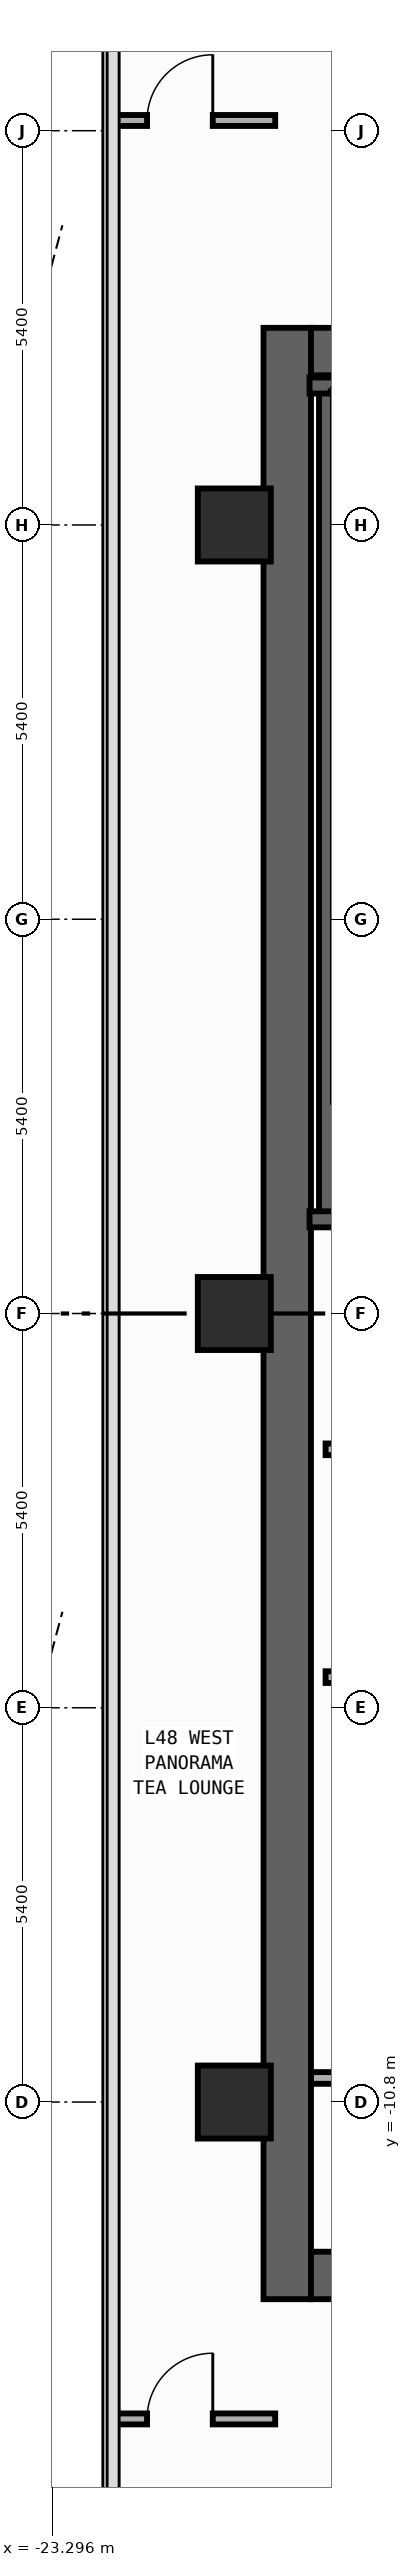
"""IFC4 building model, lengths in metres.
Left out: names, types, materials, properties, quantities, classifications, styles, units other than length and angle.
Written with IfcOpenShell. Run it as: python <this file> out.ifc"""

import sys

from ifc_helpers import new_model, si_unit, direction, frame, frame_2d, origin, origin_2d, place, context, subcontext, project, spatial, rectangle, extrude, element, fill, save


model = new_model("IFC4")
c1 = context("Model", 3, precision=1e-05, world=origin(), true_north=direction((0.0, 1.0)))
c2 = subcontext(c1, "Body", "Model", "MODEL_VIEW")
j1 = project(units=[si_unit("LENGTHUNIT", "METRE"), si_unit("PLANEANGLEUNIT", "RADIAN")], contexts=[c1])
p1 = place(None, origin())
s1 = spatial("IfcSite", under=j1, at=p1, CompositionType="ELEMENT")
p2 = place(p1, origin())
s2 = spatial("IfcBuilding", under=s1, at=p2, CompositionType="ELEMENT")
p3 = place(p2, frame((0.0, 0.0, 206.8)))
s3 = spatial("IfcBuildingStorey", under=s2, at=p3, CompositionType="ELEMENT", Elevation=206.8)
p4 = place(p3, frame((-20.075, -13.5, 0.0), z_axis=(0.0, 0.0, 1.0), x_axis=(0.0, 1.0, 0.0)))
e1 = element("IfcWall", 1, at=p4, inside=s3, PredefinedType="SHEAR", context=c2, shape_type="SweptSolid", body=[
    extrude(rectangle(XDim=27.0, YDim=0.65, at=frame_2d((13.5, 0.0))), origin(), (0.0, 0.0, 1.0), 3.54),
])
for number, where, z_axis, x_axis in (
    (2, (-19.75, -13.175, 0.0), (0.0, 0.0, 1.0), (1.0, 0.0, 0.0)),
    (3, (-19.75, 13.175, 0.0), (0.0, 0.0, 1.0), (1.0, 0.0, 0.0)),
):
    element("IfcWall", number, at=place(p3, frame(where, z_axis=z_axis, x_axis=x_axis)), inside=s3, PredefinedType="SHEAR", context=c2, shape_type="SweptSolid", body=[
        extrude(rectangle(XDim=7.1, YDim=0.65, at=frame_2d((3.55, 0.0))), origin(), (0.0, 0.0, 1.0), 3.54),
    ])
p5 = place(p3, frame((-19.53, 1.29, 0.0), z_axis=(0.0, 0.0, 1.0), x_axis=(0.0, 1.0, 0.0)))
e4 = element("IfcWall", 4, at=p5, inside=s3, PredefinedType="SHEAR", context=c2, shape_type="SweptSolid", body=[
    extrude(rectangle(XDim=11.42, YDim=0.22, at=frame_2d((5.71, 0.0))), origin(), (0.0, 0.0, 1.0), 3.54),
])
p6 = place(p3, frame((-19.77, 12.71, 0.0), z_axis=(0.0, 0.0, 1.0), x_axis=(1.0, 0.0, 0.0)))
e5 = element("IfcWall", 5, at=p6, inside=s3, PredefinedType="SHEAR", context=c2, shape_type="SweptSolid", body=[
    extrude(rectangle(XDim=4.065, YDim=0.22, at=frame_2d((2.032, 0.0))), origin(), (0.0, 0.0, 1.0), 3.54),
])
p7 = place(p3, frame((-19.77, 1.29, 0.0), z_axis=(0.0, 0.0, 1.0), x_axis=(1.0, 0.0, 0.0)))
e6 = element("IfcWall", 6, at=p7, inside=s3, PredefinedType="SHEAR", context=c2, shape_type="SweptSolid", body=[
    extrude(rectangle(XDim=4.065, YDim=0.22, at=frame_2d((2.032, 0.0))), origin(), (0.0, 0.0, 1.0), 3.54),
])
p8 = place(p7, frame((1.08, 0.0, 0.0)))
e7 = element("IfcOpeningElement", 7, at=p8, cuts=e6, PredefinedType="OPENING", context=c2, shape_type="SweptSolid", body=[
    extrude(rectangle(XDim=1.1, YDim=2.2, at=frame_2d((0.55, 1.1))), frame((0.0, 0.12, 0.0), z_axis=(0.0, -1.0, 0.0), x_axis=(1.0, 0.0, 0.0)), (0.0, 0.0, 1.0), 0.24),
])
for number, where, z_axis, x_axis in (
    (8, (-20.8, -10.8, 0.0), (0.0, 0.0, 1.0), (1.0, 0.0, 0.0)),
    (9, (-20.8, 0.0, 0.0), (0.0, 0.0, 1.0), (1.0, 0.0, 0.0)),
    (10, (-20.8, 10.8, 0.0), (0.0, 0.0, 1.0), (1.0, 0.0, 0.0)),
):
    element("IfcColumn", number, at=place(p3, frame(where, z_axis=z_axis, x_axis=x_axis)), inside=s3, PredefinedType="COLUMN", context=c2, shape_type="SweptSolid", body=[
        extrude(rectangle(XDim=1.0, YDim=1.0, at=origin_2d()), origin(), (0.0, 0.0, 1.0), 3.8),
    ])
p9 = place(p3, frame((-19.55, -1.86, 0.0), z_axis=(0.0, 0.0, 1.0), x_axis=(1.0, 0.0, 0.0)))
e11 = element("IfcWall", 11, at=p9, inside=s3, PredefinedType="STANDARD", context=c2, shape_type="SweptSolid", body=[
    extrude(rectangle(XDim=3.8, YDim=0.16, at=frame_2d((1.9, 0.0))), origin(), (0.0, 0.0, 1.0), 3.54),
])
p10 = place(p9, frame((1.18, 0.0, 0.0)))
e12 = element("IfcOpeningElement", 12, at=p10, cuts=e11, PredefinedType="OPENING", context=c2, shape_type="SweptSolid", body=[
    extrude(rectangle(XDim=1.15, YDim=2.2, at=frame_2d((0.575, 1.1))), frame((0.0, 0.09, 0.0), z_axis=(0.0, -1.0, 0.0), x_axis=(1.0, 0.0, 0.0)), (0.0, 0.0, 1.0), 0.18),
])
p11 = place(p3, frame((-19.55, -4.98, 0.0), z_axis=(0.0, 0.0, 1.0), x_axis=(1.0, 0.0, 0.0)))
e13 = element("IfcWall", 13, at=p11, inside=s3, PredefinedType="STANDARD", context=c2, shape_type="SweptSolid", body=[
    extrude(rectangle(XDim=3.8, YDim=0.16, at=frame_2d((1.9, 0.0))), origin(), (0.0, 0.0, 1.0), 3.54),
])
p12 = place(p3, frame((-19.75, -10.47, 0.0), z_axis=(0.0, 0.0, 1.0), x_axis=(1.0, 0.0, 0.0)))
e14 = element("IfcWall", 14, at=p12, inside=s3, PredefinedType="PARTITIONING", context=c2, shape_type="SweptSolid", body=[
    extrude(rectangle(XDim=2.44, YDim=0.16, at=frame_2d((1.22, 0.0))), origin(), (0.0, 0.0, 1.0), 3.54),
])
p13 = place(p3, frame((-22.455, 16.34, 0.0), z_axis=(0.0, 0.0, 1.0), x_axis=(1.0, 0.0, 0.0)))
e15 = element("IfcWall", 15, at=p13, inside=s3, PredefinedType="PARTITIONING", context=c2, shape_type="SweptSolid", body=[
    extrude(rectangle(XDim=2.215, YDim=0.15, at=frame_2d((1.107, 0.0))), origin(), (0.0, 0.0, 1.0), 3.54),
])
p14 = place(p13, frame((0.46, 0.0, 0.0)))
e16 = element("IfcOpeningElement", 16, at=p14, cuts=e15, PredefinedType="OPENING", context=c2, shape_type="SweptSolid", body=[
    extrude(rectangle(XDim=0.9, YDim=2.15, at=frame_2d((0.45, 1.075))), frame((0.0, 0.085, 0.0), z_axis=(0.0, -1.0, 0.0), x_axis=(1.0, 0.0, 0.0)), (0.0, 0.0, 1.0), 0.17),
])
p15 = place(p3, frame((-22.455, -15.14, 0.0), z_axis=(0.0, 0.0, 1.0), x_axis=(1.0, 0.0, 0.0)))
e17 = element("IfcWall", 17, at=p15, inside=s3, PredefinedType="PARTITIONING", context=c2, shape_type="SweptSolid", body=[
    extrude(rectangle(XDim=2.215, YDim=0.15, at=frame_2d((1.107, 0.0))), origin(), (0.0, 0.0, 1.0), 3.54),
])
p16 = place(p15, frame((0.46, 0.0, 0.0)))
e18 = element("IfcOpeningElement", 18, at=p16, cuts=e17, PredefinedType="OPENING", context=c2, shape_type="SweptSolid", body=[
    extrude(rectangle(XDim=0.9, YDim=2.15, at=frame_2d((0.45, 1.075))), frame((0.0, 0.085, 0.0), z_axis=(0.0, -1.0, 0.0), x_axis=(1.0, 0.0, 0.0)), (0.0, 0.0, 1.0), 0.17),
])
p17 = place(p14, origin())
e19 = element("IfcDoor", 19, at=p17, inside=s3, OperationType="SINGLE_SWING_RIGHT", PredefinedType="DOOR", context=c2, shape_type="SweptSolid", body=[
    extrude(rectangle(XDim=0.9, YDim=2.15, at=frame_2d((0.45, 1.075))), frame((0.0, 0.025, 0.0), z_axis=(0.0, -1.0, 0.0), x_axis=(1.0, 0.0, 0.0)), (0.0, 0.0, 1.0), 0.05),
])
fill(e16, e19)
p18 = place(p16, origin())
e20 = element("IfcDoor", 20, at=p18, inside=s3, OperationType="SINGLE_SWING_RIGHT", PredefinedType="DOOR", context=c2, shape_type="SweptSolid", body=[
    extrude(rectangle(XDim=0.9, YDim=2.15, at=frame_2d((0.45, 1.075))), frame((0.0, 0.025, 0.0), z_axis=(0.0, -1.0, 0.0), x_axis=(1.0, 0.0, 0.0)), (0.0, 0.0, 1.0), 0.05),
])
fill(e18, e20)
save(model, sys.argv[1])
